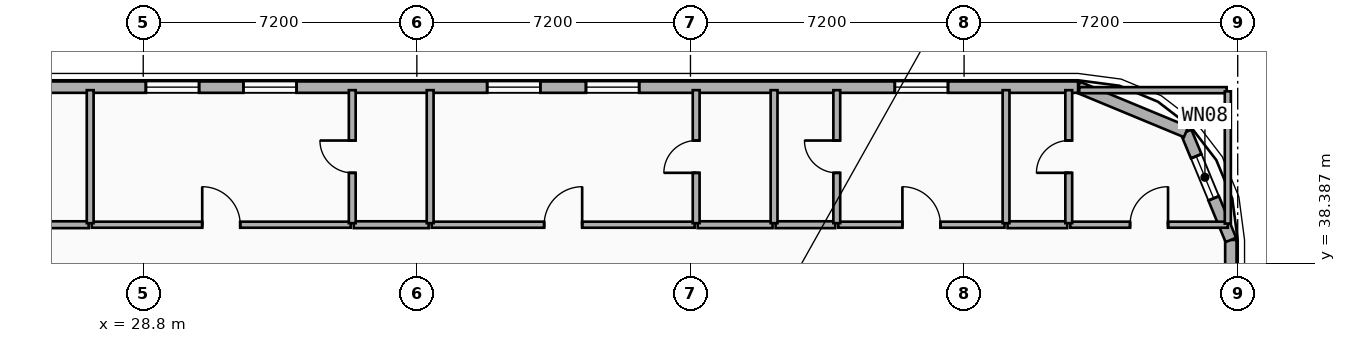
"""IFC4 building model, lengths in metres.
Left out: names, types, materials, properties, quantities, classifications, styles, units other than length and angle.
Written with IfcOpenShell. Run it as: python <this file> out.ifc"""

import sys

from ifc_helpers import new_model, si_unit, direction, frame, frame_2d, origin, place, context, subcontext, project, spatial, rectangle, extrude, element, fill, save


model = new_model("IFC4")
c1 = context("Model", 3, precision=1e-05, world=origin(), true_north=direction((0.0, 1.0)))
c2 = subcontext(c1, "Body", "Model", "MODEL_VIEW")
j1 = project(units=[si_unit("LENGTHUNIT", "METRE"), si_unit("PLANEANGLEUNIT", "RADIAN")], contexts=[c1])
p1 = place(None, origin())
s1 = spatial("IfcSite", under=j1, at=p1, CompositionType="ELEMENT")
p2 = place(p1, origin())
s2 = spatial("IfcBuilding", under=s1, at=p2, CompositionType="ELEMENT")
p3 = place(p2, frame((0.0, 0.0, 115.3)))
s3 = spatial("IfcBuildingStorey", under=s2, at=p3, CompositionType="ELEMENT", Elevation=115.3)
p4 = place(p3, frame((57.42, 39.0, 0.0), z_axis=(0.0, 0.0, 1.0), x_axis=(0.0, -1.0, 0.0)))
e1 = element("IfcWall", 1, at=p4, inside=s3, PredefinedType="SOLIDWALL", context=c2, shape_type="SweptSolid", body=[
    extrude(rectangle(XDim=18.0, YDim=0.3, at=frame_2d((9.0, 0.0))), origin(), (0.0, 0.0, 1.0), 3.24),
])
p5 = place(p4, frame((8.882, 0.0, 0.48)))
e2 = element("IfcOpeningElement", 2, at=p5, cuts=e1, PredefinedType="OPENING", context=c2, shape_type="SweptSolid", body=[
    extrude(rectangle(XDim=1.4, YDim=1.8, at=frame_2d((0.7, 0.9))), frame((0.0, 0.16, 0.0), z_axis=(0.0, -1.0, 0.0), x_axis=(1.0, 0.0, 0.0)), (0.0, 0.0, 1.0), 0.32),
])
p6 = place(p4, frame((3.621, 0.0, 0.48)))
e3 = element("IfcOpeningElement", 3, at=p6, cuts=e1, PredefinedType="OPENING", context=c2, shape_type="SweptSolid", body=[
    extrude(rectangle(XDim=1.4, YDim=1.8, at=frame_2d((0.7, 0.9))), frame((0.0, 0.16, 0.0), z_axis=(0.0, -1.0, 0.0), x_axis=(1.0, 0.0, 0.0)), (0.0, 0.0, 1.0), 0.32),
])
p7 = place(p4, frame((16.28, 0.0, 0.65)))
e4 = element("IfcOpeningElement", 4, at=p7, cuts=e1, PredefinedType="OPENING", context=c2, shape_type="SweptSolid", body=[
    extrude(rectangle(XDim=1.4, YDim=1.8, at=frame_2d((0.7, 0.9))), frame((0.0, 0.16, 0.0), z_axis=(0.0, -1.0, 0.0), x_axis=(1.0, 0.0, 0.0)), (0.0, 0.0, 1.0), 0.32),
])
p8 = place(p3, frame((56.243, 41.843, 0.0), z_axis=(0.0, 0.0, 1.0), x_axis=(0.382636798336, -0.92389884758, 0.0)))
e5 = element("IfcWall", 5, at=p8, inside=s3, PredefinedType="SOLIDWALL", context=c2, shape_type="SweptSolid", body=[
    extrude(rectangle(XDim=3.077, YDim=0.3, at=frame_2d((1.538, 0.0))), origin(), (0.0, 0.0, 1.0), 3.24),
])
p9 = place(p8, frame((0.693, 0.0, 0.75)))
e6 = element("IfcOpeningElement", 6, at=p9, cuts=e5, PredefinedType="OPENING", context=c2, shape_type="SweptSolid", body=[
    extrude(rectangle(XDim=1.2, YDim=1.5, at=frame_2d((0.6, 0.75))), frame((0.0, 0.16, 0.0), z_axis=(0.0, -1.0, 0.0), x_axis=(1.0, 0.0, 0.0)), (0.0, 0.0, 1.0), 0.32),
])
p10 = place(p3, frame((53.4, 43.02, 0.0), z_axis=(0.0, 0.0, 1.0), x_axis=(0.923882414032, -0.382676475685, 0.0)))
e7 = element("IfcWall", 7, at=p10, inside=s3, PredefinedType="SOLIDWALL", context=c2, shape_type="SweptSolid", body=[
    extrude(rectangle(XDim=3.077, YDim=0.3, at=frame_2d((1.539, 0.0))), origin(), (0.0, 0.0, 1.0), 3.24),
])
p11 = place(p3, frame((4.2, 43.02, 0.0), z_axis=(0.0, 0.0, 1.0), x_axis=(1.0, 0.0, 0.0)))
e8 = element("IfcWall", 8, at=p11, inside=s3, PredefinedType="SOLIDWALL", context=c2, shape_type="SweptSolid", body=[
    extrude(rectangle(XDim=49.2, YDim=0.3, at=frame_2d((24.6, 0.0))), origin(), (0.0, 0.0, 1.0), 3.24),
])
p12 = place(p11, frame((9.09, 0.0, 0.85)))
e9 = element("IfcOpeningElement", 9, at=p12, cuts=e8, PredefinedType="OPENING", context=c2, shape_type="SweptSolid", body=[
    extrude(rectangle(XDim=1.4, YDim=1.8, at=frame_2d((0.7, 0.9))), frame((0.0, 0.16, 0.0), z_axis=(0.0, -1.0, 0.0), x_axis=(1.0, 0.0, 0.0)), (0.0, 0.0, 1.0), 0.32),
])
p13 = place(p11, frame((11.92, 0.0, 0.85)))
e10 = element("IfcOpeningElement", 10, at=p13, cuts=e8, PredefinedType="OPENING", context=c2, shape_type="SweptSolid", body=[
    extrude(rectangle(XDim=1.4, YDim=1.8, at=frame_2d((0.7, 0.9))), frame((0.0, 0.16, 0.0), z_axis=(0.0, -1.0, 0.0), x_axis=(1.0, 0.0, 0.0)), (0.0, 0.0, 1.0), 0.32),
])
p14 = place(p11, frame((18.627, 0.0, 0.85)))
e11 = element("IfcOpeningElement", 11, at=p14, cuts=e8, PredefinedType="OPENING", context=c2, shape_type="SweptSolid", body=[
    extrude(rectangle(XDim=1.4, YDim=1.8, at=frame_2d((0.7, 0.9))), frame((0.0, 0.16, 0.0), z_axis=(0.0, -1.0, 0.0), x_axis=(1.0, 0.0, 0.0)), (0.0, 0.0, 1.0), 0.32),
])
p15 = place(p11, frame((24.669, 0.0, 0.85)))
e12 = element("IfcOpeningElement", 12, at=p15, cuts=e8, PredefinedType="OPENING", context=c2, shape_type="SweptSolid", body=[
    extrude(rectangle(XDim=1.4, YDim=1.8, at=frame_2d((0.7, 0.9))), frame((0.0, 0.16, 0.0), z_axis=(0.0, -1.0, 0.0), x_axis=(1.0, 0.0, 0.0)), (0.0, 0.0, 1.0), 0.32),
])
p16 = place(p11, frame((27.235, 0.0, 0.85)))
e13 = element("IfcOpeningElement", 13, at=p16, cuts=e8, PredefinedType="OPENING", context=c2, shape_type="SweptSolid", body=[
    extrude(rectangle(XDim=1.4, YDim=1.8, at=frame_2d((0.7, 0.9))), frame((0.0, 0.16, 0.0), z_axis=(0.0, -1.0, 0.0), x_axis=(1.0, 0.0, 0.0)), (0.0, 0.0, 1.0), 0.32),
])
p17 = place(p11, frame((33.65, 0.0, 0.85)))
e14 = element("IfcOpeningElement", 14, at=p17, cuts=e8, PredefinedType="OPENING", context=c2, shape_type="SweptSolid", body=[
    extrude(rectangle(XDim=1.4, YDim=1.8, at=frame_2d((0.7, 0.9))), frame((0.0, 0.16, 0.0), z_axis=(0.0, -1.0, 0.0), x_axis=(1.0, 0.0, 0.0)), (0.0, 0.0, 1.0), 0.32),
])
p18 = place(p11, frame((36.25, 0.0, 0.85)))
e15 = element("IfcOpeningElement", 15, at=p18, cuts=e8, PredefinedType="OPENING", context=c2, shape_type="SweptSolid", body=[
    extrude(rectangle(XDim=1.4, YDim=1.8, at=frame_2d((0.7, 0.9))), frame((0.0, 0.16, 0.0), z_axis=(0.0, -1.0, 0.0), x_axis=(1.0, 0.0, 0.0)), (0.0, 0.0, 1.0), 0.32),
])
p19 = place(p11, frame((44.377, 0.0, 0.85)))
e16 = element("IfcOpeningElement", 16, at=p19, cuts=e8, PredefinedType="OPENING", context=c2, shape_type="SweptSolid", body=[
    extrude(rectangle(XDim=1.4, YDim=1.8, at=frame_2d((0.7, 0.9))), frame((0.0, 0.16, 0.0), z_axis=(0.0, -1.0, 0.0), x_axis=(1.0, 0.0, 0.0)), (0.0, 0.0, 1.0), 0.32),
])
p20 = place(p3, frame((25.794, 39.4, 0.0), z_axis=(0.0, 0.0, 1.0), x_axis=(1.0, 0.0, 0.0)))
e17 = element("IfcWall", 17, at=p20, inside=s3, PredefinedType="PLUMBINGWALL", context=c2, shape_type="SweptSolid", body=[
    extrude(rectangle(XDim=1.57, YDim=0.18, at=frame_2d((0.785, 0.0))), origin(), (0.0, 0.0, 1.0), 3.24),
])
p21 = place(p3, frame((27.444, 39.4, 0.0), z_axis=(0.0, 0.0, 1.0), x_axis=(1.0, 0.0, 0.0)))
e18 = element("IfcWall", 18, at=p21, inside=s3, PredefinedType="PARTITIONING", context=c2, shape_type="SweptSolid", body=[
    extrude(rectangle(XDim=6.816, YDim=0.16, at=frame_2d((3.408, 0.0))), origin(), (0.0, 0.0, 1.0), 3.24),
])
p22 = place(p21, frame((2.908, 0.0, 0.0)))
e19 = element("IfcOpeningElement", 19, at=p22, cuts=e18, PredefinedType="OPENING", context=c2, shape_type="SweptSolid", body=[
    extrude(rectangle(XDim=1.0, YDim=2.15, at=frame_2d((0.5, 1.075))), frame((0.0, 0.09, 0.0), z_axis=(0.0, -1.0, 0.0), x_axis=(1.0, 0.0, 0.0)), (0.0, 0.0, 1.0), 0.18),
])
p23 = place(p3, frame((34.34, 39.4, 0.0), z_axis=(0.0, 0.0, 1.0), x_axis=(1.0, 0.0, 0.0)))
e20 = element("IfcWall", 20, at=p23, inside=s3, PredefinedType="PLUMBINGWALL", context=c2, shape_type="SweptSolid", body=[
    extrude(rectangle(XDim=1.97, YDim=0.18, at=frame_2d((0.985, 0.0))), origin(), (0.0, 0.0, 1.0), 3.24),
])
p24 = place(p3, frame((36.39, 39.4, 0.0), z_axis=(0.0, 0.0, 1.0), x_axis=(1.0, 0.0, 0.0)))
e21 = element("IfcWall", 21, at=p24, inside=s3, PredefinedType="PARTITIONING", context=c2, shape_type="SweptSolid", body=[
    extrude(rectangle(XDim=6.92, YDim=0.16, at=frame_2d((3.46, 0.0))), origin(), (0.0, 0.0, 1.0), 3.24),
])
p25 = place(p24, frame((2.96, 0.0, 0.0)))
e22 = element("IfcOpeningElement", 22, at=p25, cuts=e21, PredefinedType="OPENING", context=c2, shape_type="SweptSolid", body=[
    extrude(rectangle(XDim=1.0, YDim=2.15, at=frame_2d((0.5, 1.075))), frame((0.0, 0.09, 0.0), z_axis=(0.0, -1.0, 0.0), x_axis=(1.0, 0.0, 0.0)), (0.0, 0.0, 1.0), 0.18),
])
p26 = place(p3, frame((43.39, 39.4, 0.0), z_axis=(0.0, 0.0, 1.0), x_axis=(1.0, 0.0, 0.0)))
e23 = element("IfcWall", 23, at=p26, inside=s3, PredefinedType="PLUMBINGWALL", context=c2, shape_type="SweptSolid", body=[
    extrude(rectangle(XDim=1.97, YDim=0.18, at=frame_2d((0.985, 0.0))), origin(), (0.0, 0.0, 1.0), 3.24),
])
p27 = place(p3, frame((47.09, 39.4, 0.0), z_axis=(0.0, 0.0, 1.0), x_axis=(1.0, 0.0, 0.0)))
e24 = element("IfcWall", 24, at=p27, inside=s3, PredefinedType="PARTITIONING", context=c2, shape_type="SweptSolid", body=[
    extrude(rectangle(XDim=4.374, YDim=0.16, at=frame_2d((2.187, 0.0))), origin(), (0.0, 0.0, 1.0), 3.24),
])
p28 = place(p27, frame((1.687, 0.0, 0.0)))
e25 = element("IfcOpeningElement", 25, at=p28, cuts=e24, PredefinedType="OPENING", context=c2, shape_type="SweptSolid", body=[
    extrude(rectangle(XDim=1.0, YDim=2.15, at=frame_2d((0.5, 1.075))), frame((0.0, 0.09, 0.0), z_axis=(0.0, -1.0, 0.0), x_axis=(1.0, 0.0, 0.0)), (0.0, 0.0, 1.0), 0.18),
])
p29 = place(p3, frame((45.44, 39.4, 0.0), z_axis=(0.0, 0.0, 1.0), x_axis=(1.0, 0.0, 0.0)))
e26 = element("IfcWall", 26, at=p29, inside=s3, PredefinedType="PLUMBINGWALL", context=c2, shape_type="SweptSolid", body=[
    extrude(rectangle(XDim=1.57, YDim=0.18, at=frame_2d((0.785, 0.0))), origin(), (0.0, 0.0, 1.0), 3.24),
])
p30 = place(p3, frame((53.194, 39.4, 0.0), z_axis=(0.0, 0.0, 1.0), x_axis=(1.0, 0.0, 0.0)))
e27 = element("IfcWall", 27, at=p30, inside=s3, PredefinedType="PARTITIONING", context=c2, shape_type="SweptSolid", body=[
    extrude(rectangle(XDim=4.146, YDim=0.16, at=frame_2d((2.073, 0.0))), origin(), (0.0, 0.0, 1.0), 3.24),
])
p31 = place(p30, frame((1.573, 0.0, 0.0)))
e28 = element("IfcOpeningElement", 28, at=p31, cuts=e27, PredefinedType="OPENING", context=c2, shape_type="SweptSolid", body=[
    extrude(rectangle(XDim=1.0, YDim=2.15, at=frame_2d((0.5, 1.075))), frame((0.0, 0.09, 0.0), z_axis=(0.0, -1.0, 0.0), x_axis=(1.0, 0.0, 0.0)), (0.0, 0.0, 1.0), 0.18),
])
p32 = place(p3, frame((51.544, 39.4, 0.0), z_axis=(0.0, 0.0, 1.0), x_axis=(1.0, 0.0, 0.0)))
e29 = element("IfcWall", 29, at=p32, inside=s3, PredefinedType="PLUMBINGWALL", context=c2, shape_type="SweptSolid", body=[
    extrude(rectangle(XDim=1.57, YDim=0.18, at=frame_2d((0.785, 0.0))), origin(), (0.0, 0.0, 1.0), 3.24),
])
p33 = place(p3, frame((27.404, 39.44, 0.0), z_axis=(0.0, 0.0, 1.0), x_axis=(0.0, 1.0, 0.0)))
e30 = element("IfcWall", 30, at=p33, inside=s3, PredefinedType="PLUMBINGWALL", context=c2, shape_type="SweptSolid", body=[
    extrude(rectangle(XDim=3.5, YDim=0.18, at=frame_2d((1.75, 0.0))), origin(), (0.0, 0.0, 1.0), 3.24),
])
p34 = place(p3, frame((34.3, 39.44, 0.0), z_axis=(0.0, 0.0, 1.0), x_axis=(0.0, 1.0, 0.0)))
e31 = element("IfcWall", 31, at=p34, inside=s3, PredefinedType="PLUMBINGWALL", context=c2, shape_type="SweptSolid", body=[
    extrude(rectangle(XDim=3.5, YDim=0.18, at=frame_2d((1.75, 0.0))), origin(), (0.0, 0.0, 1.0), 3.24),
])
p35 = place(p34, frame((1.325, 0.0, 0.0)))
e32 = element("IfcOpeningElement", 32, at=p35, cuts=e31, PredefinedType="OPENING", context=c2, shape_type="SweptSolid", body=[
    extrude(rectangle(XDim=0.85, YDim=2.1, at=frame_2d((0.425, 1.05))), frame((0.0, 0.1, 0.0), z_axis=(0.0, -1.0, 0.0), x_axis=(1.0, 0.0, 0.0)), (0.0, 0.0, 1.0), 0.2),
])
p36 = place(p3, frame((36.35, 39.44, 0.0), z_axis=(0.0, 0.0, 1.0), x_axis=(0.0, 1.0, 0.0)))
e33 = element("IfcWall", 33, at=p36, inside=s3, PredefinedType="PLUMBINGWALL", context=c2, shape_type="SweptSolid", body=[
    extrude(rectangle(XDim=3.5, YDim=0.18, at=frame_2d((1.75, 0.0))), origin(), (0.0, 0.0, 1.0), 3.24),
])
p37 = place(p3, frame((43.35, 39.44, 0.0), z_axis=(0.0, 0.0, 1.0), x_axis=(0.0, 1.0, 0.0)))
e34 = element("IfcWall", 34, at=p37, inside=s3, PredefinedType="PLUMBINGWALL", context=c2, shape_type="SweptSolid", body=[
    extrude(rectangle(XDim=3.5, YDim=0.18, at=frame_2d((1.75, 0.0))), origin(), (0.0, 0.0, 1.0), 3.24),
])
p38 = place(p37, frame((1.325, 0.0, 0.0)))
e35 = element("IfcOpeningElement", 35, at=p38, cuts=e34, PredefinedType="OPENING", context=c2, shape_type="SweptSolid", body=[
    extrude(rectangle(XDim=0.85, YDim=2.1, at=frame_2d((0.425, 1.05))), frame((0.0, 0.1, 0.0), z_axis=(0.0, -1.0, 0.0), x_axis=(1.0, 0.0, 0.0)), (0.0, 0.0, 1.0), 0.2),
])
p39 = place(p3, frame((45.4, 39.44, 0.0), z_axis=(0.0, 0.0, 1.0), x_axis=(0.0, 1.0, 0.0)))
e36 = element("IfcWall", 36, at=p39, inside=s3, PredefinedType="PLUMBINGWALL", context=c2, shape_type="SweptSolid", body=[
    extrude(rectangle(XDim=3.5, YDim=0.18, at=frame_2d((1.75, 0.0))), origin(), (0.0, 0.0, 1.0), 3.24),
])
p40 = place(p3, frame((47.05, 39.44, 0.0), z_axis=(0.0, 0.0, 1.0), x_axis=(0.0, 1.0, 0.0)))
e37 = element("IfcWall", 37, at=p40, inside=s3, PredefinedType="PLUMBINGWALL", context=c2, shape_type="SweptSolid", body=[
    extrude(rectangle(XDim=3.5, YDim=0.18, at=frame_2d((1.75, 0.0))), origin(), (0.0, 0.0, 1.0), 3.24),
])
p41 = place(p40, frame((1.325, 0.0, 0.0)))
e38 = element("IfcOpeningElement", 38, at=p41, cuts=e37, PredefinedType="OPENING", context=c2, shape_type="SweptSolid", body=[
    extrude(rectangle(XDim=0.85, YDim=2.1, at=frame_2d((0.425, 1.05))), frame((0.0, 0.1, 0.0), z_axis=(0.0, -1.0, 0.0), x_axis=(1.0, 0.0, 0.0)), (0.0, 0.0, 1.0), 0.2),
])
p42 = place(p3, frame((51.504, 39.44, 0.0), z_axis=(0.0, 0.0, 1.0), x_axis=(0.0, 1.0, 0.0)))
e39 = element("IfcWall", 39, at=p42, inside=s3, PredefinedType="PLUMBINGWALL", context=c2, shape_type="SweptSolid", body=[
    extrude(rectangle(XDim=3.5, YDim=0.18, at=frame_2d((1.75, 0.0))), origin(), (0.0, 0.0, 1.0), 3.24),
])
p43 = place(p3, frame((53.154, 39.44, 0.0), z_axis=(0.0, 0.0, 1.0), x_axis=(0.0, 1.0, 0.0)))
e40 = element("IfcWall", 40, at=p43, inside=s3, PredefinedType="PLUMBINGWALL", context=c2, shape_type="SweptSolid", body=[
    extrude(rectangle(XDim=3.5, YDim=0.18, at=frame_2d((1.75, 0.0))), origin(), (0.0, 0.0, 1.0), 3.24),
])
p44 = place(p43, frame((1.325, 0.0, 0.0)))
e41 = element("IfcOpeningElement", 41, at=p44, cuts=e40, PredefinedType="OPENING", context=c2, shape_type="SweptSolid", body=[
    extrude(rectangle(XDim=0.85, YDim=2.1, at=frame_2d((0.425, 1.05))), frame((0.0, 0.1, 0.0), z_axis=(0.0, -1.0, 0.0), x_axis=(1.0, 0.0, 0.0)), (0.0, 0.0, 1.0), 0.2),
])
p45 = place(p3, frame((53.43, 42.94, 0.0), z_axis=(0.0, 0.0, 1.0), x_axis=(1.0, 0.0, 0.0)))
e42 = element("IfcWall", 42, at=p45, inside=s3, PredefinedType="PARTITIONING", context=c2, shape_type="SweptSolid", body=[
    extrude(rectangle(XDim=3.88, YDim=0.16, at=frame_2d((1.94, 0.0))), origin(), (0.0, 0.0, 1.0), 3.24),
])
p46 = place(p3, frame((57.34, 39.43, 0.0), z_axis=(0.0, 0.0, 1.0), x_axis=(0.0, 1.0, 0.0)))
e43 = element("IfcWall", 43, at=p46, inside=s3, PredefinedType="PARTITIONING", context=c2, shape_type="SweptSolid", body=[
    extrude(rectangle(XDim=3.48, YDim=0.16, at=frame_2d((1.74, 0.0))), origin(), (0.0, 0.0, 1.0), 3.24),
])
p47 = place(p15, origin())
e44 = element("IfcWindow", 44, at=p47, inside=s3, PartitioningType="SINGLE_PANEL", PredefinedType="WINDOW", context=c2, shape_type="SweptSolid", body=[
    extrude(rectangle(XDim=1.4, YDim=1.8, at=frame_2d((0.7, 0.9))), frame((0.0, 0.03, 0.0), z_axis=(0.0, -1.0, 0.0), x_axis=(1.0, 0.0, 0.0)), (0.0, 0.0, 1.0), 0.06),
])
fill(e12, e44)
p48 = place(p16, origin())
e45 = element("IfcWindow", 45, at=p48, inside=s3, PartitioningType="SINGLE_PANEL", PredefinedType="WINDOW", context=c2, shape_type="SweptSolid", body=[
    extrude(rectangle(XDim=1.4, YDim=1.8, at=frame_2d((0.7, 0.9))), frame((0.0, 0.03, 0.0), z_axis=(0.0, -1.0, 0.0), x_axis=(1.0, 0.0, 0.0)), (0.0, 0.0, 1.0), 0.06),
])
fill(e13, e45)
p49 = place(p17, origin())
e46 = element("IfcWindow", 46, at=p49, inside=s3, PartitioningType="SINGLE_PANEL", PredefinedType="WINDOW", context=c2, shape_type="SweptSolid", body=[
    extrude(rectangle(XDim=1.4, YDim=1.8, at=frame_2d((0.7, 0.9))), frame((0.0, 0.03, 0.0), z_axis=(0.0, -1.0, 0.0), x_axis=(1.0, 0.0, 0.0)), (0.0, 0.0, 1.0), 0.06),
])
fill(e14, e46)
p50 = place(p18, origin())
e47 = element("IfcWindow", 47, at=p50, inside=s3, PartitioningType="SINGLE_PANEL", PredefinedType="WINDOW", context=c2, shape_type="SweptSolid", body=[
    extrude(rectangle(XDim=1.4, YDim=1.8, at=frame_2d((0.7, 0.9))), frame((0.0, 0.03, 0.0), z_axis=(0.0, -1.0, 0.0), x_axis=(1.0, 0.0, 0.0)), (0.0, 0.0, 1.0), 0.06),
])
fill(e15, e47)
p51 = place(p19, origin())
e48 = element("IfcWindow", 48, at=p51, inside=s3, PartitioningType="SINGLE_PANEL", PredefinedType="WINDOW", context=c2, shape_type="SweptSolid", body=[
    extrude(rectangle(XDim=1.4, YDim=1.8, at=frame_2d((0.7, 0.9))), frame((0.0, 0.03, 0.0), z_axis=(0.0, -1.0, 0.0), x_axis=(1.0, 0.0, 0.0)), (0.0, 0.0, 1.0), 0.06),
])
fill(e16, e48)
p52 = place(p9, origin())
e49 = element("IfcWindow", 49, at=p52, inside=s3, PartitioningType="SINGLE_PANEL", PredefinedType="WINDOW", context=c2, shape_type="SweptSolid", body=[
    extrude(rectangle(XDim=1.2, YDim=1.5, at=frame_2d((0.6, 0.75))), frame((0.0, 0.03, 0.0), z_axis=(0.0, -1.0, 0.0), x_axis=(1.0, 0.0, 0.0)), (0.0, 0.0, 1.0), 0.06),
])
fill(e6, e49)
p53 = place(p22, origin())
e50 = element("IfcDoor", 50, at=p53, inside=s3, OperationType="SINGLE_SWING_LEFT", PredefinedType="DOOR", context=c2, shape_type="SweptSolid", body=[
    extrude(rectangle(XDim=1.0, YDim=2.15, at=frame_2d((0.5, 1.075))), frame((0.0, 0.025, 0.0), z_axis=(0.0, -1.0, 0.0), x_axis=(1.0, 0.0, 0.0)), (0.0, 0.0, 1.0), 0.05),
])
fill(e19, e50)
p54 = place(p25, origin())
e51 = element("IfcDoor", 51, at=p54, inside=s3, OperationType="SINGLE_SWING_RIGHT", PredefinedType="DOOR", context=c2, shape_type="SweptSolid", body=[
    extrude(rectangle(XDim=1.0, YDim=2.15, at=frame_2d((0.5, 1.075))), frame((0.0, 0.025, 0.0), z_axis=(0.0, -1.0, 0.0), x_axis=(1.0, 0.0, 0.0)), (0.0, 0.0, 1.0), 0.05),
])
fill(e22, e51)
p55 = place(p28, origin())
e52 = element("IfcDoor", 52, at=p55, inside=s3, OperationType="SINGLE_SWING_LEFT", PredefinedType="DOOR", context=c2, shape_type="SweptSolid", body=[
    extrude(rectangle(XDim=1.0, YDim=2.15, at=frame_2d((0.5, 1.075))), frame((0.0, 0.025, 0.0), z_axis=(0.0, -1.0, 0.0), x_axis=(1.0, 0.0, 0.0)), (0.0, 0.0, 1.0), 0.05),
])
fill(e25, e52)
p56 = place(p31, origin())
e53 = element("IfcDoor", 53, at=p56, inside=s3, OperationType="SINGLE_SWING_RIGHT", PredefinedType="DOOR", context=c2, shape_type="SweptSolid", body=[
    extrude(rectangle(XDim=1.0, YDim=2.15, at=frame_2d((0.5, 1.075))), frame((0.0, 0.025, 0.0), z_axis=(0.0, -1.0, 0.0), x_axis=(1.0, 0.0, 0.0)), (0.0, 0.0, 1.0), 0.05),
])
fill(e28, e53)
p57 = place(p35, origin())
e54 = element("IfcDoor", 54, at=p57, inside=s3, OperationType="SINGLE_SWING_RIGHT", PredefinedType="DOOR", context=c2, shape_type="SweptSolid", body=[
    extrude(rectangle(XDim=0.85, YDim=2.1, at=frame_2d((0.425, 1.05))), frame((0.0, 0.025, 0.0), z_axis=(0.0, -1.0, 0.0), x_axis=(1.0, 0.0, 0.0)), (0.0, 0.0, 1.0), 0.05),
])
fill(e32, e54)
p58 = place(p38, origin())
e55 = element("IfcDoor", 55, at=p58, inside=s3, OperationType="SINGLE_SWING_LEFT", PredefinedType="DOOR", context=c2, shape_type="SweptSolid", body=[
    extrude(rectangle(XDim=0.85, YDim=2.1, at=frame_2d((0.425, 1.05))), frame((0.0, 0.025, 0.0), z_axis=(0.0, -1.0, 0.0), x_axis=(1.0, 0.0, 0.0)), (0.0, 0.0, 1.0), 0.05),
])
fill(e35, e55)
p59 = place(p41, origin())
e56 = element("IfcDoor", 56, at=p59, inside=s3, OperationType="SINGLE_SWING_RIGHT", PredefinedType="DOOR", context=c2, shape_type="SweptSolid", body=[
    extrude(rectangle(XDim=0.85, YDim=2.1, at=frame_2d((0.425, 1.05))), frame((0.0, 0.025, 0.0), z_axis=(0.0, -1.0, 0.0), x_axis=(1.0, 0.0, 0.0)), (0.0, 0.0, 1.0), 0.05),
])
fill(e38, e56)
p60 = place(p44, origin())
e57 = element("IfcDoor", 57, at=p60, inside=s3, OperationType="SINGLE_SWING_LEFT", PredefinedType="DOOR", context=c2, shape_type="SweptSolid", body=[
    extrude(rectangle(XDim=0.85, YDim=2.1, at=frame_2d((0.425, 1.05))), frame((0.0, 0.025, 0.0), z_axis=(0.0, -1.0, 0.0), x_axis=(1.0, 0.0, 0.0)), (0.0, 0.0, 1.0), 0.05),
])
fill(e41, e57)
save(model, sys.argv[1])
